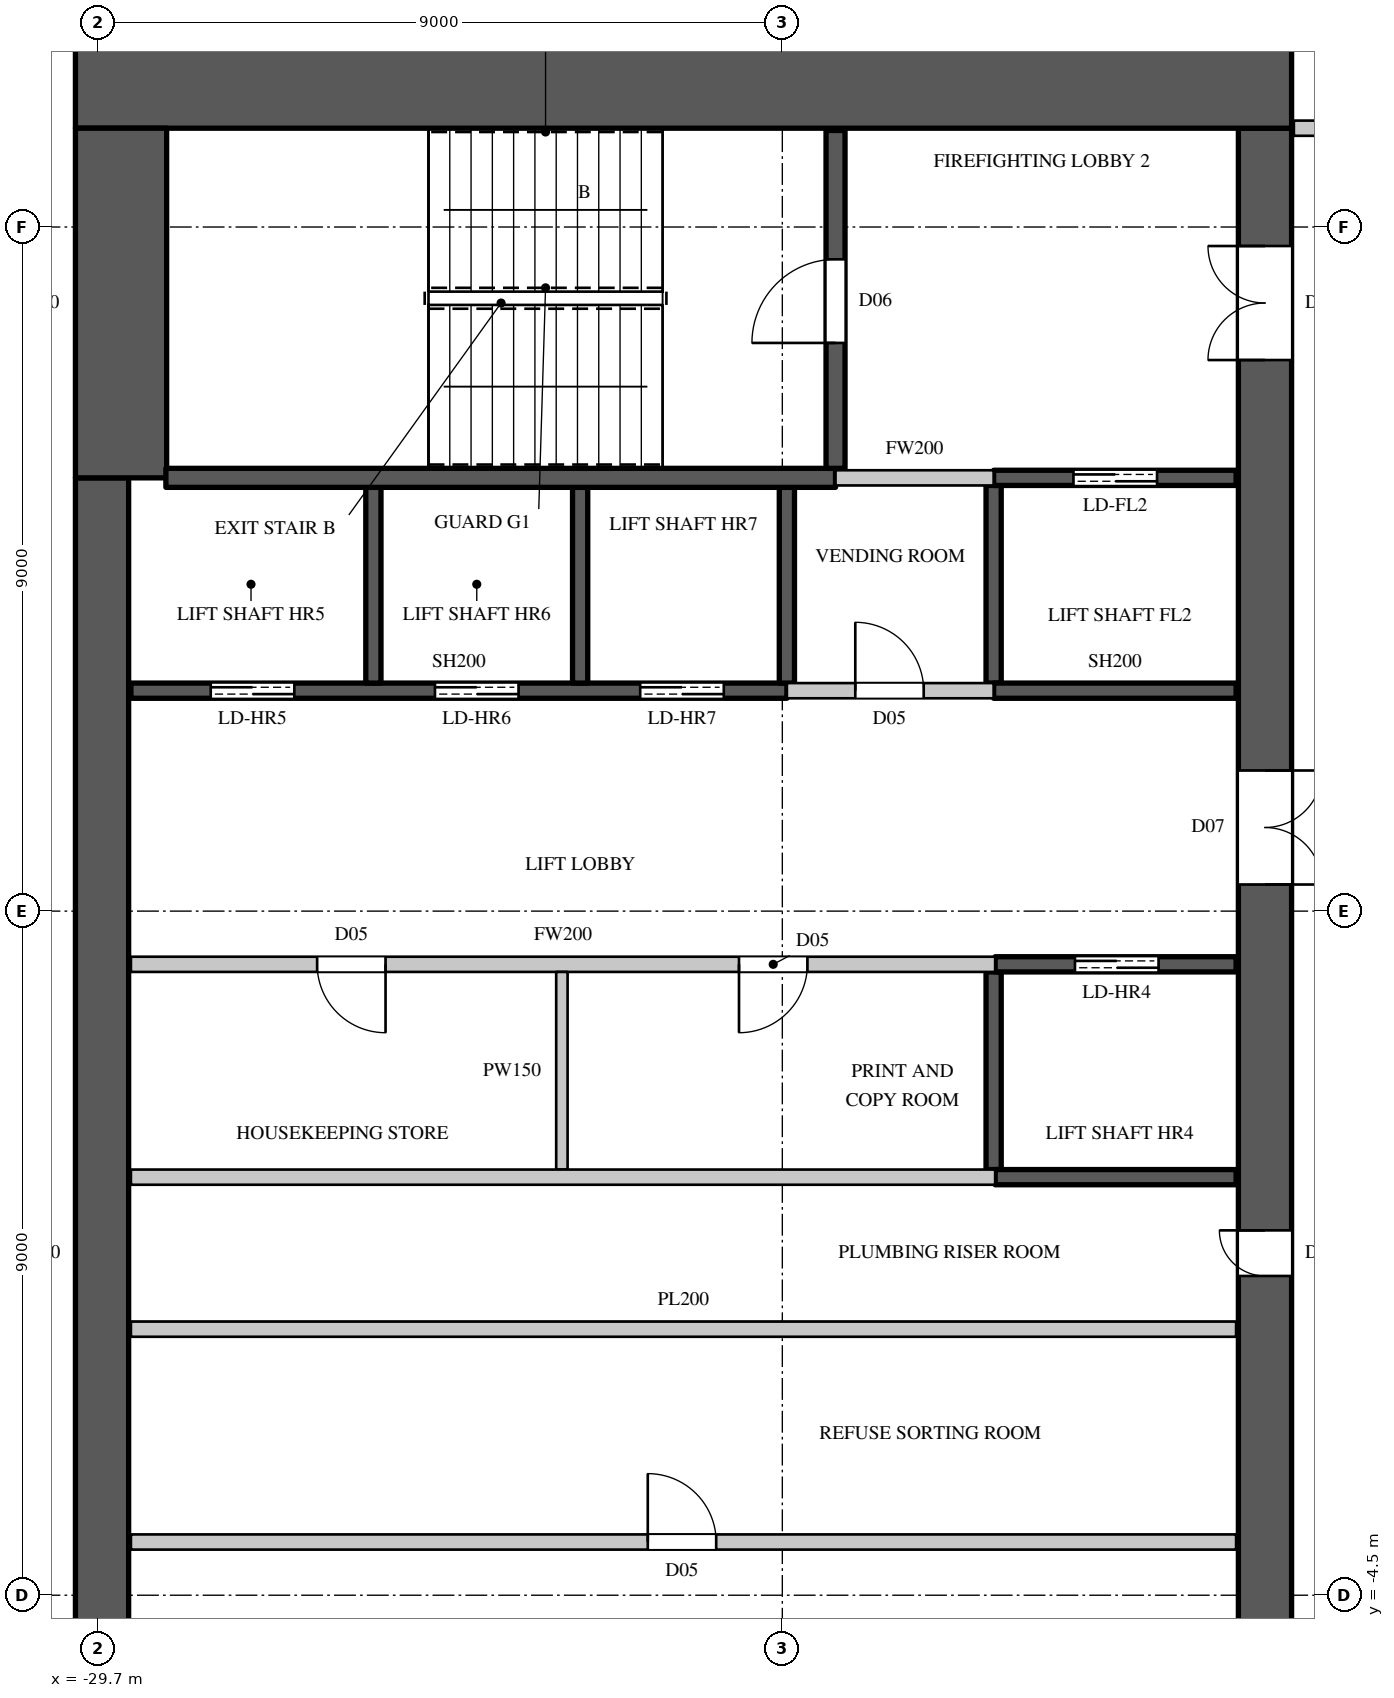
"""IFC4 building model, lengths in metres.
Left out: names, types, materials, properties, quantities, classifications, styles, units other than length and angle.
Written with IfcOpenShell. Run it as: python <this file> out.ifc"""

import sys

from ifc_helpers import new_model, si_unit, direction, frame, frame_2d, origin, place, context, subcontext, project, spatial, rectangle, extrude, element, fill, save


model = new_model("IFC4")
c1 = context("Model", 3, precision=1e-05, world=origin(), true_north=direction((0.0, 1.0)))
c2 = subcontext(c1, "Body", "Model", "MODEL_VIEW")
j1 = project(units=[si_unit("LENGTHUNIT", "METRE"), si_unit("PLANEANGLEUNIT", "RADIAN")], contexts=[c1])
p1 = place(None, origin())
s1 = spatial("IfcSite", under=j1, at=p1, CompositionType="ELEMENT")
p2 = place(p1, origin())
s2 = spatial("IfcBuilding", under=s1, at=p2, CompositionType="ELEMENT")
p3 = place(p2, frame((0.0, 0.0, 313.1)))
s3 = spatial("IfcBuildingStorey", under=s2, at=p3, CompositionType="ELEMENT", Elevation=313.1)
p4 = place(p3, frame((-30.0, 15.4, 0.0), z_axis=(0.0, 0.0, 1.0), x_axis=(1.0, 0.0, 0.0)))
e1 = element("IfcWall", 1, at=p4, inside=s3, PredefinedType="SHEAR", context=c2, shape_type="SweptSolid", body=[
    extrude(rectangle(XDim=16.0, YDim=1.2, at=frame_2d((8.0, 0.0))), origin(), (0.0, 0.0, 1.0), 4.1),
])
p5 = place(p3, frame((-14.35, -14.8, 0.0), z_axis=(0.0, 0.0, 1.0), x_axis=(0.0, 1.0, 0.0)))
e2 = element("IfcWall", 2, at=p5, inside=s3, PredefinedType="SHEAR", context=c2, shape_type="SweptSolid", body=[
    extrude(rectangle(XDim=29.6, YDim=0.7, at=frame_2d((14.8, 0.0))), origin(), (0.0, 0.0, 1.0), 4.1),
])
p6 = place(p5, frame((1.55, 0.0, 0.0)))
e3 = element("IfcOpeningElement", 3, at=p6, cuts=e2, PredefinedType="OPENING", context=c2, shape_type="SweptSolid", body=[
    extrude(rectangle(XDim=1.5, YDim=2.4, at=frame_2d((0.75, 1.2))), frame((0.0, 0.36, 0.0), z_axis=(0.0, -1.0, 0.0), x_axis=(1.0, 0.0, 0.0)), (0.0, 0.0, 1.0), 0.72),
])
p7 = place(p5, frame((26.55, 0.0, 0.0)))
e4 = element("IfcOpeningElement", 4, at=p7, cuts=e2, PredefinedType="OPENING", context=c2, shape_type="SweptSolid", body=[
    extrude(rectangle(XDim=1.5, YDim=2.4, at=frame_2d((0.75, 1.2))), frame((0.0, 0.36, 0.0), z_axis=(0.0, -1.0, 0.0), x_axis=(1.0, 0.0, 0.0)), (0.0, 0.0, 1.0), 0.72),
])
p8 = place(p5, frame((8.45, 0.0, 0.0)))
e5 = element("IfcOpeningElement", 5, at=p8, cuts=e2, PredefinedType="OPENING", context=c2, shape_type="SweptSolid", body=[
    extrude(rectangle(XDim=1.5, YDim=2.4, at=frame_2d((0.75, 1.2))), frame((0.0, 0.36, 0.0), z_axis=(0.0, -1.0, 0.0), x_axis=(1.0, 0.0, 0.0)), (0.0, 0.0, 1.0), 0.72),
])
p9 = place(p5, frame((19.65, 0.0, 0.0)))
e6 = element("IfcOpeningElement", 6, at=p9, cuts=e2, PredefinedType="OPENING", context=c2, shape_type="SweptSolid", body=[
    extrude(rectangle(XDim=1.5, YDim=2.4, at=frame_2d((0.75, 1.2))), frame((0.0, 0.36, 0.0), z_axis=(0.0, -1.0, 0.0), x_axis=(1.0, 0.0, 0.0)), (0.0, 0.0, 1.0), 0.72),
])
p10 = place(p5, frame((14.5, 0.0, 0.0)))
e7 = element("IfcOpeningElement", 7, at=p10, cuts=e2, PredefinedType="OPENING", context=c2, shape_type="SweptSolid", body=[
    extrude(rectangle(XDim=0.6, YDim=2.0, at=frame_2d((0.3, 1.0))), frame((0.0, 0.36, 0.0), z_axis=(0.0, -1.0, 0.0), x_axis=(1.0, 0.0, 0.0)), (0.0, 0.0, 1.0), 0.72),
])
p11 = place(p3, frame((-29.65, -10.2, 0.0), z_axis=(0.0, 0.0, 1.0), x_axis=(0.0, 1.0, 0.0)))
e8 = element("IfcWall", 8, at=p11, inside=s3, PredefinedType="SHEAR", context=c2, shape_type="SweptSolid", body=[
    extrude(rectangle(XDim=20.4, YDim=0.7, at=frame_2d((10.2, 0.0))), origin(), (0.0, 0.0, 1.0), 4.1),
])
p12 = place(p3, frame((-29.4, 10.2, 0.0), z_axis=(0.0, 0.0, 1.0), x_axis=(0.0, 1.0, 0.0)))
e9 = element("IfcWall", 9, at=p12, inside=s3, PredefinedType="SHEAR", context=c2, shape_type="SweptSolid", body=[
    extrude(rectangle(XDim=4.6, YDim=1.2, at=frame_2d((2.3, 0.0))), origin(), (0.0, 0.0, 1.0), 4.1),
])
p13 = place(p3, frame((-29.27, -3.8, 0.0), z_axis=(0.0, 0.0, 1.0), x_axis=(1.0, 0.0, 0.0)))
e10 = element("IfcWall", 10, at=p13, inside=s3, PredefinedType="PARTITIONING", context=c2, shape_type="SweptSolid", body=[
    extrude(rectangle(XDim=14.54, YDim=0.2, at=frame_2d((7.27, 0.0))), origin(), (0.0, 0.0, 1.0), 3.8),
])
p14 = place(p13, frame((6.8, 0.0, 0.0)))
e11 = element("IfcOpeningElement", 11, at=p14, cuts=e10, PredefinedType="OPENING", context=c2, shape_type="SweptSolid", body=[
    extrude(rectangle(XDim=0.9, YDim=2.2, at=frame_2d((0.45, 1.1))), frame((0.0, 0.11, 0.0), z_axis=(0.0, -1.0, 0.0), x_axis=(1.0, 0.0, 0.0)), (0.0, 0.0, 1.0), 0.22),
])
p15 = place(p3, frame((-29.27, 3.8, 0.0), z_axis=(0.0, 0.0, 1.0), x_axis=(1.0, 0.0, 0.0)))
e12 = element("IfcWall", 12, at=p15, inside=s3, PredefinedType="PARTITIONING", context=c2, shape_type="SweptSolid", body=[
    extrude(rectangle(XDim=11.37, YDim=0.2, at=frame_2d((5.685, 0.0))), origin(), (0.0, 0.0, 1.0), 3.8),
])
p16 = place(p15, frame((2.45, 0.0, 0.0)))
e13 = element("IfcOpeningElement", 13, at=p16, cuts=e12, PredefinedType="OPENING", context=c2, shape_type="SweptSolid", body=[
    extrude(rectangle(XDim=0.9, YDim=2.2, at=frame_2d((0.45, 1.1))), frame((0.0, 0.11, 0.0), z_axis=(0.0, -1.0, 0.0), x_axis=(1.0, 0.0, 0.0)), (0.0, 0.0, 1.0), 0.22),
])
p17 = place(p15, frame((8.0, 0.0, 0.0)))
e14 = element("IfcOpeningElement", 14, at=p17, cuts=e12, PredefinedType="OPENING", context=c2, shape_type="SweptSolid", body=[
    extrude(rectangle(XDim=0.9, YDim=2.2, at=frame_2d((0.45, 1.1))), frame((0.0, 0.11, 0.0), z_axis=(0.0, -1.0, 0.0), x_axis=(1.0, 0.0, 0.0)), (0.0, 0.0, 1.0), 0.22),
])
p18 = place(p3, frame((-20.64, 7.4, 0.0), z_axis=(0.0, 0.0, 1.0), x_axis=(1.0, 0.0, 0.0)))
e15 = element("IfcWall", 15, at=p18, inside=s3, PredefinedType="PARTITIONING", context=c2, shape_type="SweptSolid", body=[
    extrude(rectangle(XDim=2.72, YDim=0.2, at=frame_2d((1.36, 0.0))), origin(), (0.0, 0.0, 1.0), 3.8),
])
p19 = place(p18, frame((0.9, 0.0, 0.0)))
e16 = element("IfcOpeningElement", 16, at=p19, cuts=e15, PredefinedType="OPENING", context=c2, shape_type="SweptSolid", body=[
    extrude(rectangle(XDim=0.9, YDim=2.2, at=frame_2d((0.45, 1.1))), frame((0.0, 0.11, 0.0), z_axis=(0.0, -1.0, 0.0), x_axis=(1.0, 0.0, 0.0)), (0.0, 0.0, 1.0), 0.22),
])
p20 = place(p3, frame((-20.0, 10.2, 0.0), z_axis=(0.0, 0.0, 1.0), x_axis=(1.0, 0.0, 0.0)))
e17 = element("IfcWall", 17, at=p20, inside=s3, PredefinedType="PARTITIONING", context=c2, shape_type="SweptSolid", body=[
    extrude(rectangle(XDim=2.08, YDim=0.2, at=frame_2d((1.04, 0.0))), origin(), (0.0, 0.0, 1.0), 3.8),
])
p21 = place(p3, frame((-13.97, 14.8, 0.0), z_axis=(0.0, 0.0, 1.0), x_axis=(1.0, 0.0, 0.0)))
e18 = element("IfcWall", 18, at=p21, inside=s3, PredefinedType="PARTITIONING", context=c2, shape_type="SweptSolid", body=[
    extrude(rectangle(XDim=3.07, YDim=0.2, at=frame_2d((1.535, 0.0))), origin(), (0.0, 0.0, 1.0), 3.8),
])
p22 = place(p3, frame((-23.6, 1.1, 0.0), z_axis=(0.0, 0.0, 1.0), x_axis=(0.0, 1.0, 0.0)))
e19 = element("IfcWall", 19, at=p22, inside=s3, PredefinedType="PARTITIONING", context=c2, shape_type="SweptSolid", body=[
    extrude(rectangle(XDim=2.6, YDim=0.15, at=frame_2d((1.3, 0.0))), origin(), (0.0, 0.0, 1.0), 3.8),
])
p23 = place(p3, frame((-29.27, -1.0, 0.0), z_axis=(0.0, 0.0, 1.0), x_axis=(1.0, 0.0, 0.0)))
e20 = element("IfcWall", 20, at=p23, inside=s3, PredefinedType="PARTITIONING", context=c2, shape_type="SweptSolid", body=[
    extrude(rectangle(XDim=14.54, YDim=0.2, at=frame_2d((7.27, 0.0))), origin(), (0.0, 0.0, 1.0), 3.8),
])
p24 = place(p3, frame((-29.27, 1.0, 0.0), z_axis=(0.0, 0.0, 1.0), x_axis=(1.0, 0.0, 0.0)))
e21 = element("IfcWall", 21, at=p24, inside=s3, PredefinedType="PARTITIONING", context=c2, shape_type="SweptSolid", body=[
    extrude(rectangle(XDim=11.37, YDim=0.2, at=frame_2d((5.685, 0.0))), origin(), (0.0, 0.0, 1.0), 3.8),
])
p25 = place(p3, frame((-29.27, 7.4, 0.0), z_axis=(0.0, 0.0, 1.0), x_axis=(1.0, 0.0, 0.0)))
e22 = element("IfcWall", 22, at=p25, inside=s3, PredefinedType="SHEAR", context=c2, shape_type="SweptSolid", body=[
    extrude(rectangle(XDim=8.63, YDim=0.2, at=frame_2d((4.315, 0.0))), origin(), (0.0, 0.0, 1.0), 3.8),
])
p26 = place(p25, frame((1.05, 0.0, 0.0)))
e23 = element("IfcOpeningElement", 23, at=p26, cuts=e22, PredefinedType="OPENING", context=c2, shape_type="SweptSolid", body=[
    extrude(rectangle(XDim=1.1, YDim=2.2, at=frame_2d((0.55, 1.1))), frame((0.0, 0.11, 0.0), z_axis=(0.0, -1.0, 0.0), x_axis=(1.0, 0.0, 0.0)), (0.0, 0.0, 1.0), 0.22),
])
p27 = place(p25, frame((4.0, 0.0, 0.0)))
e24 = element("IfcOpeningElement", 24, at=p27, cuts=e22, PredefinedType="OPENING", context=c2, shape_type="SweptSolid", body=[
    extrude(rectangle(XDim=1.1, YDim=2.2, at=frame_2d((0.55, 1.1))), frame((0.0, 0.11, 0.0), z_axis=(0.0, -1.0, 0.0), x_axis=(1.0, 0.0, 0.0)), (0.0, 0.0, 1.0), 0.22),
])
p28 = place(p25, frame((6.7, 0.0, 0.0)))
e25 = element("IfcOpeningElement", 25, at=p28, cuts=e22, PredefinedType="OPENING", context=c2, shape_type="SweptSolid", body=[
    extrude(rectangle(XDim=1.1, YDim=2.2, at=frame_2d((0.55, 1.1))), frame((0.0, 0.11, 0.0), z_axis=(0.0, -1.0, 0.0), x_axis=(1.0, 0.0, 0.0)), (0.0, 0.0, 1.0), 0.22),
])
for number, where, z_axis, x_axis in (
    (26, (-26.08, 7.5, 0.0), (0.0, 0.0, 1.0), (0.0, 1.0, 0.0)),
    (27, (-23.36, 7.5, 0.0), (0.0, 0.0, 1.0), (0.0, 1.0, 0.0)),
):
    element("IfcWall", number, at=place(p3, frame(where, z_axis=z_axis, x_axis=x_axis)), inside=s3, PredefinedType="SHEAR", context=c2, shape_type="SweptSolid", body=[
        extrude(rectangle(XDim=2.575, YDim=0.2, at=frame_2d((1.288, 0.0))), origin(), (0.0, 0.0, 1.0), 4.1),
    ])
p29 = place(p3, frame((-20.64, 7.5, 0.0), z_axis=(0.0, 0.0, 1.0), x_axis=(0.0, 1.0, 0.0)))
e28 = element("IfcWall", 28, at=p29, inside=s3, PredefinedType="SHEAR", context=c2, shape_type="SweptSolid", body=[
    extrude(rectangle(XDim=2.575, YDim=0.2, at=frame_2d((1.288, 0.0))), origin(), (0.0, 0.0, 1.0), 3.8),
])
p30 = place(p3, frame((-17.92, 1.1, 0.0), z_axis=(0.0, 0.0, 1.0), x_axis=(0.0, 1.0, 0.0)))
e29 = element("IfcWall", 29, at=p30, inside=s3, PredefinedType="SHEAR", context=c2, shape_type="SweptSolid", body=[
    extrude(rectangle(XDim=2.6, YDim=0.2, at=frame_2d((1.3, 0.0))), origin(), (0.0, 0.0, 1.0), 3.8),
])
p31 = place(p3, frame((-17.9, 1.0, 0.0), z_axis=(0.0, 0.0, 1.0), x_axis=(1.0, 0.0, 0.0)))
e30 = element("IfcWall", 30, at=p31, inside=s3, PredefinedType="SHEAR", context=c2, shape_type="SweptSolid", body=[
    extrude(rectangle(XDim=3.17, YDim=0.2, at=frame_2d((1.585, 0.0))), origin(), (0.0, 0.0, 1.0), 3.8),
])
p32 = place(p3, frame((-17.9, 3.8, 0.0), z_axis=(0.0, 0.0, 1.0), x_axis=(1.0, 0.0, 0.0)))
e31 = element("IfcWall", 31, at=p32, inside=s3, PredefinedType="SHEAR", context=c2, shape_type="SweptSolid", body=[
    extrude(rectangle(XDim=3.17, YDim=0.2, at=frame_2d((1.585, 0.0))), origin(), (0.0, 0.0, 1.0), 3.8),
])
p33 = place(p32, frame((1.05, 0.0, 0.0)))
e32 = element("IfcOpeningElement", 32, at=p33, cuts=e31, PredefinedType="OPENING", context=c2, shape_type="SweptSolid", body=[
    extrude(rectangle(XDim=1.1, YDim=2.2, at=frame_2d((0.55, 1.1))), frame((0.0, 0.11, 0.0), z_axis=(0.0, -1.0, 0.0), x_axis=(1.0, 0.0, 0.0)), (0.0, 0.0, 1.0), 0.22),
])
p34 = place(p3, frame((-17.92, 7.5, 0.0), z_axis=(0.0, 0.0, 1.0), x_axis=(0.0, 1.0, 0.0)))
e33 = element("IfcWall", 33, at=p34, inside=s3, PredefinedType="SHEAR", context=c2, shape_type="SweptSolid", body=[
    extrude(rectangle(XDim=2.6, YDim=0.2, at=frame_2d((1.3, 0.0))), origin(), (0.0, 0.0, 1.0), 3.8),
])
p35 = place(p3, frame((-17.92, 7.4, 0.0), z_axis=(0.0, 0.0, 1.0), x_axis=(1.0, 0.0, 0.0)))
e34 = element("IfcWall", 34, at=p35, inside=s3, PredefinedType="SHEAR", context=c2, shape_type="SweptSolid", body=[
    extrude(rectangle(XDim=3.19, YDim=0.2, at=frame_2d((1.595, 0.0))), origin(), (0.0, 0.0, 1.0), 3.8),
])
p36 = place(p3, frame((-17.92, 10.2, 0.0), z_axis=(0.0, 0.0, 1.0), x_axis=(1.0, 0.0, 0.0)))
e35 = element("IfcWall", 35, at=p36, inside=s3, PredefinedType="SHEAR", context=c2, shape_type="SweptSolid", body=[
    extrude(rectangle(XDim=3.19, YDim=0.2, at=frame_2d((1.595, 0.0))), origin(), (0.0, 0.0, 1.0), 3.8),
])
p37 = place(p36, frame((1.05, 0.0, 0.0)))
e36 = element("IfcOpeningElement", 36, at=p37, cuts=e35, PredefinedType="OPENING", context=c2, shape_type="SweptSolid", body=[
    extrude(rectangle(XDim=1.1, YDim=2.2, at=frame_2d((0.55, 1.1))), frame((0.0, 0.11, 0.0), z_axis=(0.0, -1.0, 0.0), x_axis=(1.0, 0.0, 0.0)), (0.0, 0.0, 1.0), 0.22),
])
p38 = place(p3, frame((-28.81, 10.2, 0.0), z_axis=(0.0, 0.0, 1.0), x_axis=(1.0, 0.0, 0.0)))
e37 = element("IfcWall", 37, at=p38, inside=s3, PredefinedType="SHEAR", context=c2, shape_type="SweptSolid", body=[
    extrude(rectangle(XDim=8.81, YDim=0.25, at=frame_2d((4.405, 0.0))), origin(), (0.0, 0.0, 1.0), 3.8),
])
p39 = place(p3, frame((-20.0, 10.325, 0.0), z_axis=(0.0, 0.0, 1.0), x_axis=(0.0, 1.0, 0.0)))
e38 = element("IfcWall", 38, at=p39, inside=s3, PredefinedType="SHEAR", context=c2, shape_type="SweptSolid", body=[
    extrude(rectangle(XDim=4.445, YDim=0.25, at=frame_2d((2.223, 0.0))), origin(), (0.0, 0.0, 1.0), 3.8),
])
p40 = place(p39, frame((1.65, 0.0, 0.0)))
e39 = element("IfcOpeningElement", 39, at=p40, cuts=e38, PredefinedType="OPENING", context=c2, shape_type="SweptSolid", body=[
    extrude(rectangle(XDim=1.1, YDim=2.2, at=frame_2d((0.55, 1.1))), frame((0.0, 0.135, 0.0), z_axis=(0.0, -1.0, 0.0), x_axis=(1.0, 0.0, 0.0)), (0.0, 0.0, 1.0), 0.27),
])
p41 = place(p40, origin())
e40 = element("IfcDoor", 40, at=p41, inside=s3, OperationType="SINGLE_SWING_LEFT", PredefinedType="DOOR", context=c2, shape_type="SweptSolid", body=[
    extrude(rectangle(XDim=1.1, YDim=2.2, at=frame_2d((0.55, 1.1))), frame((0.0, 0.025, 0.0), z_axis=(0.0, -1.0, 0.0), x_axis=(1.0, 0.0, 0.0)), (0.0, 0.0, 1.0), 0.05),
])
fill(e39, e40)
p42 = place(p14, origin())
e41 = element("IfcDoor", 41, at=p42, inside=s3, OperationType="SINGLE_SWING_LEFT", PredefinedType="DOOR", context=c2, shape_type="SweptSolid", body=[
    extrude(rectangle(XDim=0.9, YDim=2.2, at=frame_2d((0.45, 1.1))), frame((0.0, 0.025, 0.0), z_axis=(0.0, -1.0, 0.0), x_axis=(1.0, 0.0, 0.0)), (0.0, 0.0, 1.0), 0.05),
])
fill(e11, e41)
p43 = place(p16, origin())
e42 = element("IfcDoor", 42, at=p43, inside=s3, OperationType="SINGLE_SWING_LEFT", PredefinedType="DOOR", context=c2, shape_type="SweptSolid", body=[
    extrude(rectangle(XDim=0.9, YDim=2.2, at=frame_2d((0.45, 1.1))), frame((0.0, 0.025, 0.0), z_axis=(0.0, -1.0, 0.0), x_axis=(1.0, 0.0, 0.0)), (0.0, 0.0, 1.0), 0.05),
])
fill(e13, e42)
p44 = place(p17, origin())
e43 = element("IfcDoor", 43, at=p44, inside=s3, OperationType="SINGLE_SWING_RIGHT", PredefinedType="DOOR", context=c2, shape_type="SweptSolid", body=[
    extrude(rectangle(XDim=0.9, YDim=2.2, at=frame_2d((0.45, 1.1))), frame((0.0, 0.025, 0.0), z_axis=(0.0, -1.0, 0.0), x_axis=(1.0, 0.0, 0.0)), (0.0, 0.0, 1.0), 0.05),
])
fill(e14, e43)
p45 = place(p19, origin())
e44 = element("IfcDoor", 44, at=p45, inside=s3, OperationType="SINGLE_SWING_LEFT", PredefinedType="DOOR", context=c2, shape_type="SweptSolid", body=[
    extrude(rectangle(XDim=0.9, YDim=2.2, at=frame_2d((0.45, 1.1))), frame((0.0, 0.025, 0.0), z_axis=(0.0, -1.0, 0.0), x_axis=(1.0, 0.0, 0.0)), (0.0, 0.0, 1.0), 0.05),
])
fill(e16, e44)
p46 = place(p33, origin())
e45 = element("IfcDoor", 45, at=p46, inside=s3, OperationType="DOUBLE_DOOR_SLIDING", PredefinedType="DOOR", context=c2, shape_type="SweptSolid", body=[
    extrude(rectangle(XDim=1.1, YDim=2.2, at=frame_2d((0.55, 1.1))), frame((0.0, 0.025, 0.0), z_axis=(0.0, -1.0, 0.0), x_axis=(1.0, 0.0, 0.0)), (0.0, 0.0, 1.0), 0.05),
])
fill(e32, e45)
p47 = place(p26, origin())
e46 = element("IfcDoor", 46, at=p47, inside=s3, OperationType="DOUBLE_DOOR_SLIDING", PredefinedType="DOOR", context=c2, shape_type="SweptSolid", body=[
    extrude(rectangle(XDim=1.1, YDim=2.2, at=frame_2d((0.55, 1.1))), frame((0.0, 0.025, 0.0), z_axis=(0.0, -1.0, 0.0), x_axis=(1.0, 0.0, 0.0)), (0.0, 0.0, 1.0), 0.05),
])
fill(e23, e46)
p48 = place(p27, origin())
e47 = element("IfcDoor", 47, at=p48, inside=s3, OperationType="DOUBLE_DOOR_SLIDING", PredefinedType="DOOR", context=c2, shape_type="SweptSolid", body=[
    extrude(rectangle(XDim=1.1, YDim=2.2, at=frame_2d((0.55, 1.1))), frame((0.0, 0.025, 0.0), z_axis=(0.0, -1.0, 0.0), x_axis=(1.0, 0.0, 0.0)), (0.0, 0.0, 1.0), 0.05),
])
fill(e24, e47)
p49 = place(p28, origin())
e48 = element("IfcDoor", 48, at=p49, inside=s3, OperationType="DOUBLE_DOOR_SLIDING", PredefinedType="DOOR", context=c2, shape_type="SweptSolid", body=[
    extrude(rectangle(XDim=1.1, YDim=2.2, at=frame_2d((0.55, 1.1))), frame((0.0, 0.025, 0.0), z_axis=(0.0, -1.0, 0.0), x_axis=(1.0, 0.0, 0.0)), (0.0, 0.0, 1.0), 0.05),
])
fill(e25, e48)
p50 = place(p37, origin())
e49 = element("IfcDoor", 49, at=p50, inside=s3, OperationType="DOUBLE_DOOR_SLIDING", PredefinedType="DOOR", context=c2, shape_type="SweptSolid", body=[
    extrude(rectangle(XDim=1.1, YDim=2.2, at=frame_2d((0.55, 1.1))), frame((0.0, 0.025, 0.0), z_axis=(0.0, -1.0, 0.0), x_axis=(1.0, 0.0, 0.0)), (0.0, 0.0, 1.0), 0.05),
])
fill(e36, e49)
p51 = place(p7, origin())
e50 = element("IfcDoor", 50, at=p51, inside=s3, OperationType="DOUBLE_DOOR_SINGLE_SWING", PredefinedType="DOOR", context=c2, shape_type="SweptSolid", body=[
    extrude(rectangle(XDim=1.5, YDim=2.4, at=frame_2d((0.75, 1.2))), frame((0.0, 0.345, 0.0), z_axis=(0.0, -1.0, 0.0), x_axis=(1.0, 0.0, 0.0)), (0.0, 0.0, 1.0), 0.05),
])
fill(e4, e50)
p52 = place(p9, origin())
e51 = element("IfcDoor", 51, at=p52, inside=s3, OperationType="DOUBLE_DOOR_SINGLE_SWING", PredefinedType="DOOR", context=c2, shape_type="SweptSolid", body=[
    extrude(rectangle(XDim=1.5, YDim=2.4, at=frame_2d((0.75, 1.2))), frame((0.0, -0.295, 0.0), z_axis=(0.0, -1.0, 0.0), x_axis=(1.0, 0.0, 0.0)), (0.0, 0.0, 1.0), 0.05),
])
fill(e6, e51)
p53 = place(p10, origin())
e52 = element("IfcDoor", 52, at=p53, inside=s3, OperationType="SINGLE_SWING_RIGHT", PredefinedType="DOOR", context=c2, shape_type="SweptSolid", body=[
    extrude(rectangle(XDim=0.6, YDim=2.0, at=frame_2d((0.3, 1.0))), frame((0.0, 0.345, 0.0), z_axis=(0.0, -1.0, 0.0), x_axis=(1.0, 0.0, 0.0)), (0.0, 0.0, 1.0), 0.05),
])
fill(e7, e52)
save(model, sys.argv[1])
